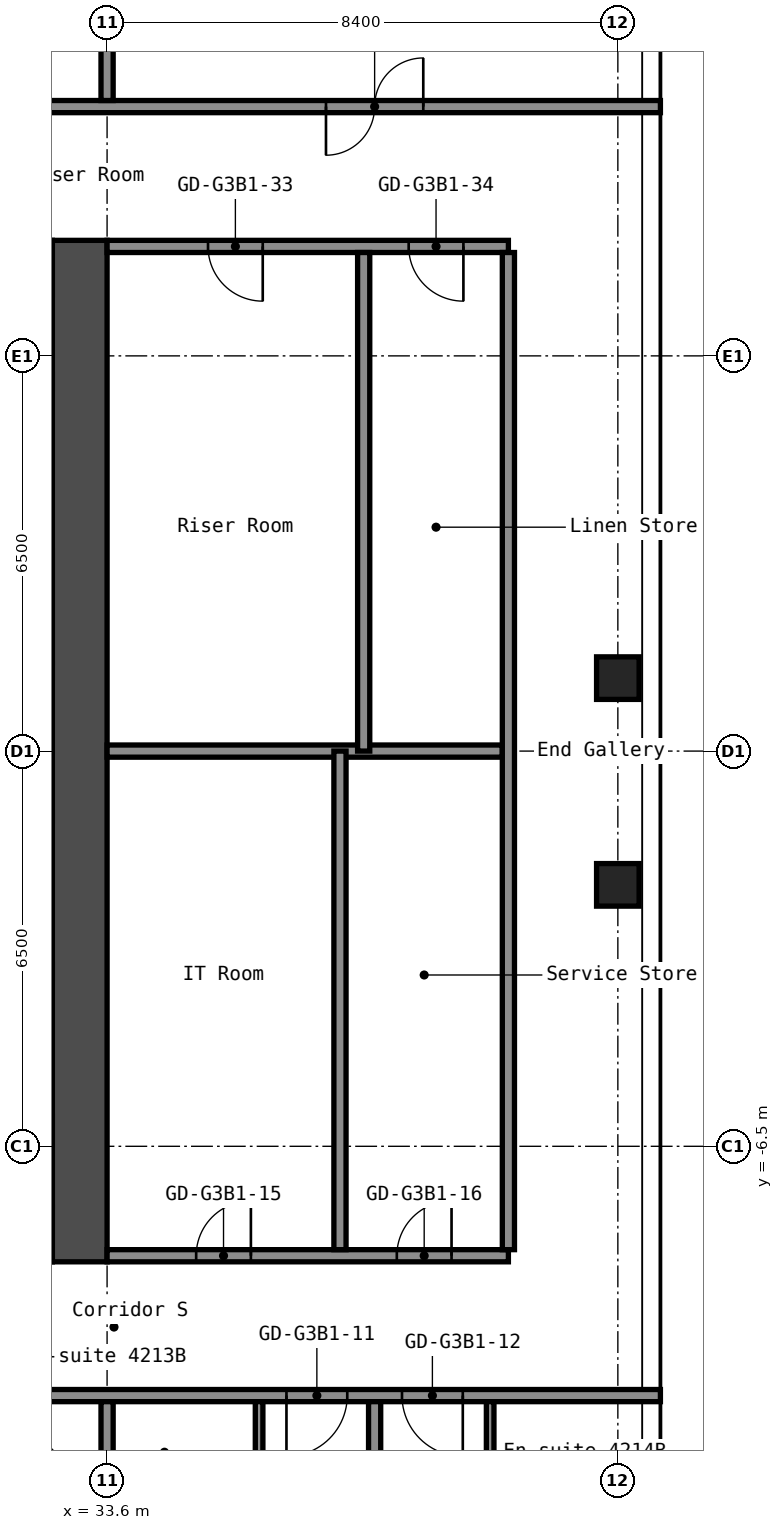
"""IFC4 building model, lengths in metres.
Left out: names, types, materials, properties, quantities, classifications, styles, units other than length and angle.
Written with IfcOpenShell. Run it as: python <this file> out.ifc"""

import sys

from ifc_helpers import new_model, si_unit, direction, frame, frame_2d, origin, origin_2d, place, context, subcontext, project, spatial, rectangle, hollow_rectangle, extrude, element, fill, save


model = new_model("IFC4")
c1 = context("Model", 3, precision=1e-05, world=origin(), true_north=direction((0.0, 1.0)))
c2 = subcontext(c1, "Body", "Model", "MODEL_VIEW")
j1 = project(units=[si_unit("LENGTHUNIT", "METRE"), si_unit("PLANEANGLEUNIT", "RADIAN")], contexts=[c1])
p1 = place(None, origin())
s1 = spatial("IfcSite", under=j1, at=p1, CompositionType="ELEMENT")
p2 = place(p1, origin())
s2 = spatial("IfcBuilding", under=s1, at=p2, CompositionType="ELEMENT")
p3 = place(p2, frame((0.0, 0.0, 150.2)))
s3 = spatial("IfcBuildingStorey", under=s2, at=p3, CompositionType="ELEMENT", Elevation=150.2)
for number, where, z_axis, x_axis in (
    (1, (42.0, -2.2, 0.0), (0.0, 0.0, 1.0), (1.0, 0.0, 0.0)),
    (2, (42.0, 1.2, 0.0), (0.0, 0.0, 1.0), (1.0, 0.0, 0.0)),
):
    element("IfcColumn", number, at=place(p3, frame(where, z_axis=z_axis, x_axis=x_axis)), inside=s3, PredefinedType="COLUMN", context=c2, shape_type="SweptSolid", body=[
        extrude(hollow_rectangle(XDim=0.7, YDim=0.7, WallThickness=0.028, at=origin_2d()), origin(), (0.0, 0.0, 1.0), 2.75),
    ])
p4 = place(p3, frame((33.15, -8.4, 0.0), z_axis=(0.0, 0.0, 1.0), x_axis=(0.0, 1.0, 0.0)))
e3 = element("IfcWall", 3, at=p4, inside=s3, PredefinedType="SHEAR", context=c2, shape_type="SweptSolid", body=[
    extrude(rectangle(XDim=16.8, YDim=0.9, at=frame_2d((8.4, 0.0))), origin(), (0.0, 0.0, 1.0), 2.75),
])
p5 = place(p3, frame((16.8, -10.6, 0.0), z_axis=(0.0, 0.0, 1.0), x_axis=(1.0, 0.0, 0.0)))
e4 = element("IfcWall", 4, at=p5, inside=s3, PredefinedType="PARTITIONING", context=c2, shape_type="SweptSolid", body=[
    extrude(rectangle(XDim=25.9, YDim=0.2, at=frame_2d((12.95, 0.0))), origin(), (0.0, 0.0, 1.0), 2.75),
])
p6 = place(p5, frame((2.85, 0.0, 0.0)))
e5 = element("IfcOpeningElement", 5, at=p6, cuts=e4, PredefinedType="OPENING", context=c2, shape_type="SweptSolid", body=[
    extrude(rectangle(XDim=1.0, YDim=2.1, at=frame_2d((0.5, 1.05))), frame((0.0, 0.11, 0.0), z_axis=(0.0, -1.0, 0.0), x_axis=(1.0, 0.0, 0.0)), (0.0, 0.0, 1.0), 0.22),
])
p7 = place(p5, frame((4.55, 0.0, 0.0)))
e6 = element("IfcOpeningElement", 6, at=p7, cuts=e4, PredefinedType="OPENING", context=c2, shape_type="SweptSolid", body=[
    extrude(rectangle(XDim=1.0, YDim=2.1, at=frame_2d((0.5, 1.05))), frame((0.0, 0.11, 0.0), z_axis=(0.0, -1.0, 0.0), x_axis=(1.0, 0.0, 0.0)), (0.0, 0.0, 1.0), 0.22),
])
p8 = place(p5, frame((11.25, 0.0, 0.0)))
e7 = element("IfcOpeningElement", 7, at=p8, cuts=e4, PredefinedType="OPENING", context=c2, shape_type="SweptSolid", body=[
    extrude(rectangle(XDim=1.0, YDim=2.1, at=frame_2d((0.5, 1.05))), frame((0.0, 0.11, 0.0), z_axis=(0.0, -1.0, 0.0), x_axis=(1.0, 0.0, 0.0)), (0.0, 0.0, 1.0), 0.22),
])
p9 = place(p5, frame((12.95, 0.0, 0.0)))
e8 = element("IfcOpeningElement", 8, at=p9, cuts=e4, PredefinedType="OPENING", context=c2, shape_type="SweptSolid", body=[
    extrude(rectangle(XDim=1.0, YDim=2.1, at=frame_2d((0.5, 1.05))), frame((0.0, 0.11, 0.0), z_axis=(0.0, -1.0, 0.0), x_axis=(1.0, 0.0, 0.0)), (0.0, 0.0, 1.0), 0.22),
])
p10 = place(p5, frame((19.75, 0.0, 0.0)))
e9 = element("IfcOpeningElement", 9, at=p10, cuts=e4, PredefinedType="OPENING", context=c2, shape_type="SweptSolid", body=[
    extrude(rectangle(XDim=1.0, YDim=2.1, at=frame_2d((0.5, 1.05))), frame((0.0, 0.11, 0.0), z_axis=(0.0, -1.0, 0.0), x_axis=(1.0, 0.0, 0.0)), (0.0, 0.0, 1.0), 0.22),
])
p11 = place(p5, frame((21.65, 0.0, 0.0)))
e10 = element("IfcOpeningElement", 10, at=p11, cuts=e4, PredefinedType="OPENING", context=c2, shape_type="SweptSolid", body=[
    extrude(rectangle(XDim=1.0, YDim=2.1, at=frame_2d((0.5, 1.05))), frame((0.0, 0.11, 0.0), z_axis=(0.0, -1.0, 0.0), x_axis=(1.0, 0.0, 0.0)), (0.0, 0.0, 1.0), 0.22),
])
p12 = place(p3, frame((33.6, -8.3, 0.0), z_axis=(0.0, 0.0, 1.0), x_axis=(1.0, 0.0, 0.0)))
e11 = element("IfcWall", 11, at=p12, inside=s3, PredefinedType="PARTITIONING", context=c2, shape_type="SweptSolid", body=[
    extrude(rectangle(XDim=6.6, YDim=0.2, at=frame_2d((3.3, 0.0))), origin(), (0.0, 0.0, 1.0), 2.75),
])
p13 = place(p12, frame((1.465, 0.0, 0.0)))
e12 = element("IfcOpeningElement", 12, at=p13, cuts=e11, PredefinedType="OPENING", context=c2, shape_type="SweptSolid", body=[
    extrude(rectangle(XDim=0.9, YDim=2.1, at=frame_2d((0.45, 1.05))), frame((0.0, 0.11, 0.0), z_axis=(0.0, -1.0, 0.0), x_axis=(1.0, 0.0, 0.0)), (0.0, 0.0, 1.0), 0.22),
])
p14 = place(p12, frame((4.765, 0.0, 0.0)))
e13 = element("IfcOpeningElement", 13, at=p14, cuts=e11, PredefinedType="OPENING", context=c2, shape_type="SweptSolid", body=[
    extrude(rectangle(XDim=0.9, YDim=2.1, at=frame_2d((0.45, 1.05))), frame((0.0, 0.11, 0.0), z_axis=(0.0, -1.0, 0.0), x_axis=(1.0, 0.0, 0.0)), (0.0, 0.0, 1.0), 0.22),
])
p15 = place(p3, frame((33.6, 0.0, 0.0), z_axis=(0.0, 0.0, 1.0), x_axis=(1.0, 0.0, 0.0)))
e14 = element("IfcWall", 14, at=p15, inside=s3, PredefinedType="PARTITIONING", context=c2, shape_type="SweptSolid", body=[
    extrude(rectangle(XDim=6.5, YDim=0.2, at=frame_2d((3.25, 0.0))), origin(), (0.0, 0.0, 1.0), 2.75),
])
p16 = place(p3, frame((33.6, 8.3, 0.0), z_axis=(0.0, 0.0, 1.0), x_axis=(1.0, 0.0, 0.0)))
e15 = element("IfcWall", 15, at=p16, inside=s3, PredefinedType="PARTITIONING", context=c2, shape_type="SweptSolid", body=[
    extrude(rectangle(XDim=6.6, YDim=0.2, at=frame_2d((3.3, 0.0))), origin(), (0.0, 0.0, 1.0), 2.75),
])
p17 = place(p16, frame((1.66, 0.0, 0.0)))
e16 = element("IfcOpeningElement", 16, at=p17, cuts=e15, PredefinedType="OPENING", context=c2, shape_type="SweptSolid", body=[
    extrude(rectangle(XDim=0.9, YDim=2.1, at=frame_2d((0.45, 1.05))), frame((0.0, 0.11, 0.0), z_axis=(0.0, -1.0, 0.0), x_axis=(1.0, 0.0, 0.0)), (0.0, 0.0, 1.0), 0.22),
])
p18 = place(p16, frame((4.96, 0.0, 0.0)))
e17 = element("IfcOpeningElement", 17, at=p18, cuts=e15, PredefinedType="OPENING", context=c2, shape_type="SweptSolid", body=[
    extrude(rectangle(XDim=0.9, YDim=2.1, at=frame_2d((0.45, 1.05))), frame((0.0, 0.11, 0.0), z_axis=(0.0, -1.0, 0.0), x_axis=(1.0, 0.0, 0.0)), (0.0, 0.0, 1.0), 0.22),
])
p19 = place(p3, frame((16.8, 10.6, 0.0), z_axis=(0.0, 0.0, 1.0), x_axis=(1.0, 0.0, 0.0)))
e18 = element("IfcWall", 18, at=p19, inside=s3, PredefinedType="PARTITIONING", context=c2, shape_type="SweptSolid", body=[
    extrude(rectangle(XDim=25.9, YDim=0.2, at=frame_2d((12.95, 0.0))), origin(), (0.0, 0.0, 1.0), 2.75),
])
p20 = place(p19, frame((3.4, 0.0, 0.0)))
e19 = element("IfcOpeningElement", 19, at=p20, cuts=e18, PredefinedType="OPENING", context=c2, shape_type="SweptSolid", body=[
    extrude(rectangle(XDim=1.6, YDim=2.1, at=frame_2d((0.8, 1.05))), frame((0.0, 0.11, 0.0), z_axis=(0.0, -1.0, 0.0), x_axis=(1.0, 0.0, 0.0)), (0.0, 0.0, 1.0), 0.22),
])
p21 = place(p19, frame((11.8, 0.0, 0.0)))
e20 = element("IfcOpeningElement", 20, at=p21, cuts=e18, PredefinedType="OPENING", context=c2, shape_type="SweptSolid", body=[
    extrude(rectangle(XDim=1.6, YDim=2.1, at=frame_2d((0.8, 1.05))), frame((0.0, 0.11, 0.0), z_axis=(0.0, -1.0, 0.0), x_axis=(1.0, 0.0, 0.0)), (0.0, 0.0, 1.0), 0.22),
])
p22 = place(p19, frame((20.4, 0.0, 0.0)))
e21 = element("IfcOpeningElement", 21, at=p22, cuts=e18, PredefinedType="OPENING", context=c2, shape_type="SweptSolid", body=[
    extrude(rectangle(XDim=1.6, YDim=2.1, at=frame_2d((0.8, 1.05))), frame((0.0, 0.11, 0.0), z_axis=(0.0, -1.0, 0.0), x_axis=(1.0, 0.0, 0.0)), (0.0, 0.0, 1.0), 0.22),
])
p23 = place(p3, frame((33.6, -19.3, 0.0), z_axis=(0.0, 0.0, 1.0), x_axis=(0.0, 1.0, 0.0)))
e22 = element("IfcWall", 22, at=p23, inside=s3, PredefinedType="PARTITIONING", context=c2, shape_type="SweptSolid", body=[
    extrude(rectangle(XDim=8.6, YDim=0.2, at=frame_2d((4.3, 0.0))), origin(), (0.0, 0.0, 1.0), 2.75),
])
p24 = place(p3, frame((33.6, 10.7, 0.0), z_axis=(0.0, 0.0, 1.0), x_axis=(0.0, 1.0, 0.0)))
e23 = element("IfcWall", 23, at=p24, inside=s3, PredefinedType="PARTITIONING", context=c2, shape_type="SweptSolid", body=[
    extrude(rectangle(XDim=7.6, YDim=0.2, at=frame_2d((3.8, 0.0))), origin(), (0.0, 0.0, 1.0), 2.75),
])
p25 = place(p3, frame((36.1, -13.6, 0.0), z_axis=(0.0, 0.0, 1.0), x_axis=(0.0, 1.0, 0.0)))
e24 = element("IfcWall", 24, at=p25, inside=s3, PredefinedType="PARTITIONING", context=c2, shape_type="SweptSolid", body=[
    extrude(rectangle(XDim=2.9, YDim=0.125, at=frame_2d((1.45, 0.0))), origin(), (0.0, 0.0, 1.0), 2.75),
])
p26 = place(p25, frame((0.6, 0.0, 0.0)))
e25 = element("IfcOpeningElement", 25, at=p26, cuts=e24, PredefinedType="OPENING", context=c2, shape_type="SweptSolid", body=[
    extrude(rectangle(XDim=0.8, YDim=2.1, at=frame_2d((0.4, 1.05))), frame((0.0, 0.073, 0.0), z_axis=(0.0, -1.0, 0.0), x_axis=(1.0, 0.0, 0.0)), (0.0, 0.0, 1.0), 0.145),
])
for number, where, z_axis, x_axis in (
    (26, (37.43, -8.2, 0.0), (0.0, 0.0, 1.0), (0.0, 1.0, 0.0)),
    (27, (37.82, 0.0, 0.0), (0.0, 0.0, 1.0), (0.0, 1.0, 0.0)),
):
    element("IfcWall", number, at=place(p3, frame(where, z_axis=z_axis, x_axis=x_axis)), inside=s3, PredefinedType="PARTITIONING", context=c2, shape_type="SweptSolid", body=[
        extrude(rectangle(XDim=8.2, YDim=0.2, at=frame_2d((4.1, 0.0))), origin(), (0.0, 0.0, 1.0), 2.75),
    ])
p27 = place(p3, frame((38.0, -19.3, 0.0), z_axis=(0.0, 0.0, 1.0), x_axis=(0.0, 1.0, 0.0)))
e28 = element("IfcWall", 28, at=p27, inside=s3, PredefinedType="PARTITIONING", context=c2, shape_type="SweptSolid", body=[
    extrude(rectangle(XDim=8.6, YDim=0.2, at=frame_2d((4.3, 0.0))), origin(), (0.0, 0.0, 1.0), 2.75),
])
p28 = place(p3, frame((39.9, -13.6, 0.0), z_axis=(0.0, 0.0, 1.0), x_axis=(0.0, 1.0, 0.0)))
e29 = element("IfcWall", 29, at=p28, inside=s3, PredefinedType="PARTITIONING", context=c2, shape_type="SweptSolid", body=[
    extrude(rectangle(XDim=2.9, YDim=0.125, at=frame_2d((1.45, 0.0))), origin(), (0.0, 0.0, 1.0), 2.75),
])
p29 = place(p28, frame((0.6, 0.0, 0.0)))
e30 = element("IfcOpeningElement", 30, at=p29, cuts=e29, PredefinedType="OPENING", context=c2, shape_type="SweptSolid", body=[
    extrude(rectangle(XDim=0.8, YDim=2.1, at=frame_2d((0.4, 1.05))), frame((0.0, 0.073, 0.0), z_axis=(0.0, -1.0, 0.0), x_axis=(1.0, 0.0, 0.0)), (0.0, 0.0, 1.0), 0.145),
])
p30 = place(p3, frame((40.2, -8.2, 0.0), z_axis=(0.0, 0.0, 1.0), x_axis=(0.0, 1.0, 0.0)))
e31 = element("IfcWall", 31, at=p30, inside=s3, PredefinedType="PARTITIONING", context=c2, shape_type="SweptSolid", body=[
    extrude(rectangle(XDim=16.4, YDim=0.2, at=frame_2d((8.2, 0.0))), origin(), (0.0, 0.0, 1.0), 2.75),
])
p31 = place(p10, origin())
e32 = element("IfcDoor", 32, at=p31, inside=s3, OperationType="SINGLE_SWING_LEFT", PredefinedType="DOOR", context=c2, shape_type="SweptSolid", body=[
    extrude(rectangle(XDim=1.0, YDim=2.1, at=frame_2d((0.5, 1.05))), frame((0.0, 0.025, 0.0), z_axis=(0.0, -1.0, 0.0), x_axis=(1.0, 0.0, 0.0)), (0.0, 0.0, 1.0), 0.05),
])
fill(e9, e32)
p32 = place(p11, origin())
e33 = element("IfcDoor", 33, at=p32, inside=s3, OperationType="SINGLE_SWING_RIGHT", PredefinedType="DOOR", context=c2, shape_type="SweptSolid", body=[
    extrude(rectangle(XDim=1.0, YDim=2.1, at=frame_2d((0.5, 1.05))), frame((0.0, 0.025, 0.0), z_axis=(0.0, -1.0, 0.0), x_axis=(1.0, 0.0, 0.0)), (0.0, 0.0, 1.0), 0.05),
])
fill(e10, e33)
p33 = place(p13, origin())
e34 = element("IfcDoor", 34, at=p33, inside=s3, OperationType="SINGLE_SWING_LEFT", PredefinedType="DOOR", context=c2, shape_type="SweptSolid", body=[
    extrude(rectangle(XDim=0.9, YDim=2.1, at=frame_2d((0.45, 1.05))), frame((0.0, 0.025, 0.0), z_axis=(0.0, -1.0, 0.0), x_axis=(1.0, 0.0, 0.0)), (0.0, 0.0, 1.0), 0.05),
])
fill(e12, e34)
p34 = place(p14, origin())
e35 = element("IfcDoor", 35, at=p34, inside=s3, OperationType="SINGLE_SWING_LEFT", PredefinedType="DOOR", context=c2, shape_type="SweptSolid", body=[
    extrude(rectangle(XDim=0.9, YDim=2.1, at=frame_2d((0.45, 1.05))), frame((0.0, 0.025, 0.0), z_axis=(0.0, -1.0, 0.0), x_axis=(1.0, 0.0, 0.0)), (0.0, 0.0, 1.0), 0.05),
])
fill(e13, e35)
p35 = place(p17, origin())
e36 = element("IfcDoor", 36, at=p35, inside=s3, OperationType="SINGLE_SWING_RIGHT", PredefinedType="DOOR", context=c2, shape_type="SweptSolid", body=[
    extrude(rectangle(XDim=0.9, YDim=2.1, at=frame_2d((0.45, 1.05))), frame((0.0, 0.025, 0.0), z_axis=(0.0, -1.0, 0.0), x_axis=(1.0, 0.0, 0.0)), (0.0, 0.0, 1.0), 0.05),
])
fill(e16, e36)
p36 = place(p18, origin())
e37 = element("IfcDoor", 37, at=p36, inside=s3, OperationType="SINGLE_SWING_RIGHT", PredefinedType="DOOR", context=c2, shape_type="SweptSolid", body=[
    extrude(rectangle(XDim=0.9, YDim=2.1, at=frame_2d((0.45, 1.05))), frame((0.0, 0.025, 0.0), z_axis=(0.0, -1.0, 0.0), x_axis=(1.0, 0.0, 0.0)), (0.0, 0.0, 1.0), 0.05),
])
fill(e17, e37)
p37 = place(p22, origin())
e38 = element("IfcDoor", 38, at=p37, inside=s3, OperationType="DOUBLE_DOOR_SINGLE_SWING", PredefinedType="DOOR", context=c2, shape_type="SweptSolid", body=[
    extrude(rectangle(XDim=1.6, YDim=2.1, at=frame_2d((0.8, 1.05))), frame((0.0, 0.025, 0.0), z_axis=(0.0, -1.0, 0.0), x_axis=(1.0, 0.0, 0.0)), (0.0, 0.0, 1.0), 0.05),
])
fill(e21, e38)
save(model, sys.argv[1])
